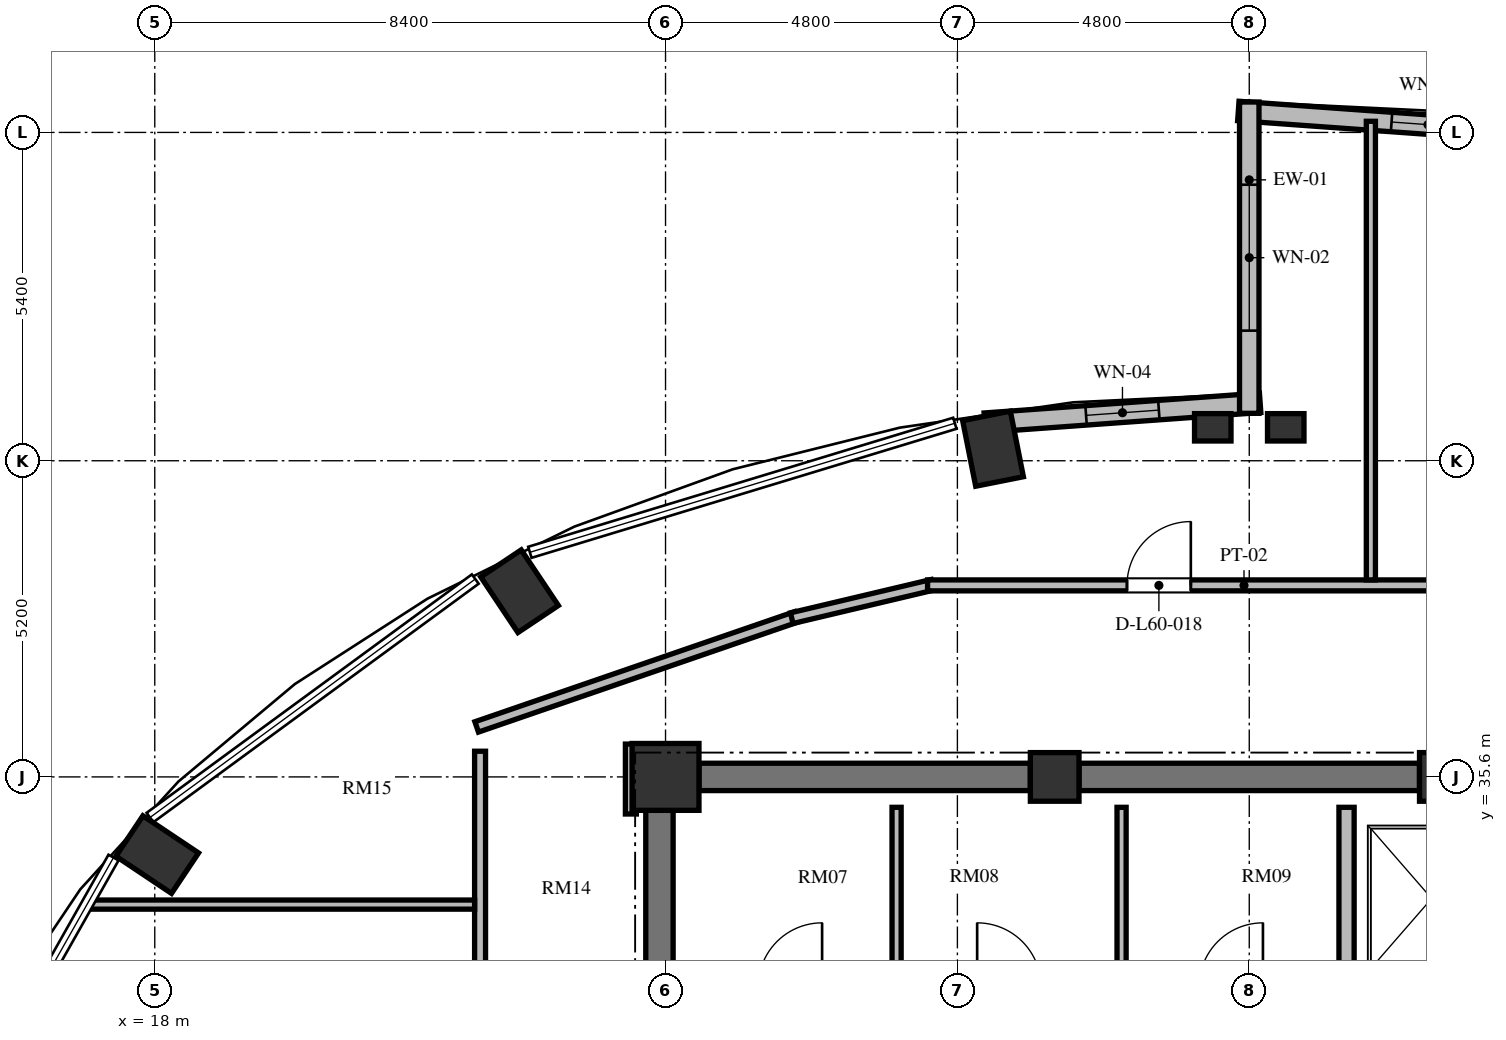
"""IFC4 building model, lengths in metres.
Left out: names, types, materials, properties, quantities, classifications, styles, units other than length and angle.
Written with IfcOpenShell. Run it as: python <this file> out.ifc"""

import sys

from ifc_helpers import new_model, si_unit, direction, frame, frame_2d, origin, origin_2d, place, context, subcontext, project, spatial, rectangle, extrude, element, fill, save


model = new_model("IFC4")
c1 = context("Model", 3, precision=1e-05, world=origin(), true_north=direction((0.0, 1.0)))
c2 = subcontext(c1, "Body", "Model", "MODEL_VIEW")
j1 = project(units=[si_unit("LENGTHUNIT", "METRE"), si_unit("PLANEANGLEUNIT", "RADIAN")], contexts=[c1])
p1 = place(None, origin())
s1 = spatial("IfcSite", under=j1, at=p1, CompositionType="ELEMENT")
p2 = place(p1, origin())
s2 = spatial("IfcBuilding", under=s1, at=p2, CompositionType="ELEMENT")
p3 = place(p2, frame((0.0, 0.0, 231.312)))
s3 = spatial("IfcBuildingStorey", under=s2, at=p3, CompositionType="ELEMENT", Elevation=231.312)
for number, where, z_axis, x_axis in (
    (1, (31.786, 40.998, 0.0), (0.0, 0.0, 1.0), (-0.195, 0.981, 0.0)),
    (2, (24.0, 38.654, 0.0), (0.0, 0.0, 1.0), (-0.556, 0.831, 0.0)),
    (3, (18.04, 34.323, 0.0), (0.0, 0.0, 1.0), (-0.831, 0.556, 0.0)),
):
    element("IfcColumn", number, at=place(p3, frame(where, z_axis=z_axis, x_axis=x_axis)), inside=s3, PredefinedType="COLUMN", context=c2, shape_type="SweptSolid", body=[
        extrude(rectangle(XDim=1.1, YDim=0.8, at=origin_2d()), origin(), (0.0, 0.0, 1.0), 3.648),
    ])
for number, where, z_axis, x_axis in (
    (4, (39.2, 35.6, 0.0), (0.0, 0.0, 1.0), (1.0, 0.0, 0.0)),
    (5, (32.8, 35.6, 0.0), (0.0, 0.0, 1.0), (1.0, 0.0, 0.0)),
):
    element("IfcColumn", number, at=place(p3, frame(where, z_axis=z_axis, x_axis=x_axis)), inside=s3, PredefinedType="COLUMN", context=c2, shape_type="SweptSolid", body=[
        extrude(rectangle(XDim=0.8, YDim=0.8, at=origin_2d()), origin(), (0.0, 0.0, 1.0), 3.648),
    ])
p4 = place(p3, frame((26.4, 35.6, 0.0), z_axis=(0.0, 0.0, 1.0), x_axis=(1.0, 0.0, 0.0)))
e6 = element("IfcColumn", 6, at=p4, inside=s3, PredefinedType="COLUMN", context=c2, shape_type="SweptSolid", body=[
    extrude(rectangle(XDim=1.1, YDim=1.1, at=origin_2d()), origin(), (0.0, 0.0, 1.0), 3.648),
])
for number, where, z_axis, x_axis in (
    (7, (35.4, 41.35, 0.0), (0.0, 0.0, 1.0), (1.0, 0.0, 0.0)),
    (8, (36.6, 41.35, 0.0), (0.0, 0.0, 1.0), (1.0, 0.0, 0.0)),
):
    element("IfcColumn", number, at=place(p3, frame(where, z_axis=z_axis, x_axis=x_axis)), inside=s3, PredefinedType="PILASTER", context=c2, shape_type="SweptSolid", body=[
        extrude(rectangle(XDim=0.6, YDim=0.45, at=origin_2d()), origin(), (0.0, 0.0, 1.0), 3.648),
    ])
p5 = place(p3, frame((26.3, 20.95, 0.0), z_axis=(0.0, 0.0, 1.0), x_axis=(0.0, 1.0, 0.0)))
e9 = element("IfcWall", 9, at=p5, inside=s3, PredefinedType="SHEAR", context=c2, shape_type="SweptSolid", body=[
    extrude(rectangle(XDim=14.1, YDim=0.45, at=frame_2d((7.05, 0.0))), origin(), (0.0, 0.0, 1.0), 3.648),
])
p6 = place(p5, frame((6.5, 0.0, 0.0)))
e10 = element("IfcOpeningElement", 10, at=p6, cuts=e9, PredefinedType="OPENING", context=c2, shape_type="SweptSolid", body=[
    extrude(rectangle(XDim=1.2, YDim=2.15, at=frame_2d((0.6, 1.075))), frame((0.0, 0.235, 0.0), z_axis=(0.0, -1.0, 0.0), x_axis=(1.0, 0.0, 0.0)), (0.0, 0.0, 1.0), 0.47),
])
p7 = place(p5, frame((9.6, 0.0, 0.0)))
e11 = element("IfcOpeningElement", 11, at=p7, cuts=e9, PredefinedType="OPENING", context=c2, shape_type="SweptSolid", body=[
    extrude(rectangle(XDim=1.3, YDim=2.2, at=frame_2d((0.65, 1.1))), frame((0.0, 0.235, 0.0), z_axis=(0.0, -1.0, 0.0), x_axis=(1.0, 0.0, 0.0)), (0.0, 0.0, 1.0), 0.47),
])
p8 = place(p5, frame((3.26, 0.0, 0.0)))
e12 = element("IfcOpeningElement", 12, at=p8, cuts=e9, PredefinedType="OPENING", context=c2, shape_type="SweptSolid", body=[
    extrude(rectangle(XDim=1.3, YDim=2.2, at=frame_2d((0.65, 1.1))), frame((0.0, 0.235, 0.0), z_axis=(0.0, -1.0, 0.0), x_axis=(1.0, 0.0, 0.0)), (0.0, 0.0, 1.0), 0.47),
])
p9 = place(p3, frame((26.95, 35.6, 0.0), z_axis=(0.0, 0.0, 1.0), x_axis=(1.0, 0.0, 0.0)))
e13 = element("IfcWall", 13, at=p9, inside=s3, PredefinedType="SHEAR", context=c2, shape_type="SweptSolid", body=[
    extrude(rectangle(XDim=5.45, YDim=0.45, at=frame_2d((2.725, 0.0))), origin(), (0.0, 0.0, 1.0), 3.648),
])
p10 = place(p3, frame((33.2, 35.6, 0.0), z_axis=(0.0, 0.0, 1.0), x_axis=(1.0, 0.0, 0.0)))
e14 = element("IfcWall", 14, at=p10, inside=s3, PredefinedType="SHEAR", context=c2, shape_type="SweptSolid", body=[
    extrude(rectangle(XDim=5.6, YDim=0.45, at=frame_2d((2.8, 0.0))), origin(), (0.0, 0.0, 1.0), 3.648),
])
p11 = place(p3, frame((40.35, 46.226, 0.0), z_axis=(0.0, 0.0, 1.0), x_axis=(-0.997409061056, 0.071938619141, 0.0)))
e15 = element("IfcWall", 15, at=p11, inside=s3, PredefinedType="SOLIDWALL", context=c2, shape_type="SweptSolid", body=[
    extrude(rectangle(XDim=4.541, YDim=0.32, at=frame_2d((2.271, 0.0))), origin(), (0.0, 0.0, 1.0), 3.448),
])
p12 = place(p11, frame((0.815, 0.0, 0.85)))
e16 = element("IfcOpeningElement", 16, at=p12, cuts=e15, PredefinedType="OPENING", context=c2, shape_type="SweptSolid", body=[
    extrude(rectangle(XDim=1.2, YDim=2.2, at=frame_2d((0.6, 1.1))), frame((0.0, 0.17, 0.0), z_axis=(0.0, -1.0, 0.0), x_axis=(1.0, 0.0, 0.0)), (0.0, 0.0, 1.0), 0.34),
])
p13 = place(p3, frame((36.179, 41.753, 0.0), z_axis=(0.0, 0.0, 1.0), x_axis=(-0.997408782787, -0.071942477163, 0.0)))
e17 = element("IfcWall", 17, at=p13, inside=s3, PredefinedType="SOLIDWALL", context=c2, shape_type="SweptSolid", body=[
    extrude(rectangle(XDim=4.541, YDim=0.32, at=frame_2d((2.27, 0.0))), origin(), (0.0, 0.0, 1.0), 3.448),
])
p14 = place(p13, frame((1.67, 0.0, 0.85)))
e18 = element("IfcOpeningElement", 18, at=p14, cuts=e17, PredefinedType="OPENING", context=c2, shape_type="SweptSolid", body=[
    extrude(rectangle(XDim=1.2, YDim=1.8, at=frame_2d((0.6, 0.9))), frame((0.0, 0.17, 0.0), z_axis=(0.0, -1.0, 0.0), x_axis=(1.0, 0.0, 0.0)), (0.0, 0.0, 1.0), 0.34),
])
p15 = place(p3, frame((36.0, 46.7, 0.0), z_axis=(0.0, 0.0, 1.0), x_axis=(0.0, -1.0, 0.0)))
e19 = element("IfcWall", 19, at=p15, inside=s3, PredefinedType="SOLIDWALL", context=c2, shape_type="SweptSolid", body=[
    extrude(rectangle(XDim=5.12, YDim=0.32, at=frame_2d((2.56, 0.0))), origin(), (0.0, 0.0, 1.0), 3.448),
])
p16 = place(p15, frame((1.36, 0.0, 0.84)))
e20 = element("IfcOpeningElement", 20, at=p16, cuts=e19, PredefinedType="OPENING", context=c2, shape_type="SweptSolid", body=[
    extrude(rectangle(XDim=2.4, YDim=2.04, at=frame_2d((1.2, 1.02))), frame((0.0, 0.17, 0.0), z_axis=(0.0, -1.0, 0.0), x_axis=(1.0, 0.0, 0.0)), (0.0, 0.0, 1.0), 0.34),
])
p17 = place(p3, frame((37.6, 32.42, 0.0), z_axis=(0.0, 0.0, 1.0), x_axis=(0.0, 1.0, 0.0)))
e21 = element("IfcWall", 21, at=p17, inside=s3, PredefinedType="SOLIDWALL", context=c2, shape_type="SweptSolid", body=[
    extrude(rectangle(XDim=2.68, YDim=0.25, at=frame_2d((1.34, 0.0))), origin(), (0.0, 0.0, 1.0), 3.448),
])
for number, where, z_axis, x_axis in (
    (22, (30.2, 32.42, 0.0), (0.0, 0.0, 1.0), (0.0, 1.0, 0.0)),
    (23, (33.9, 32.42, 0.0), (0.0, 0.0, 1.0), (0.0, 1.0, 0.0)),
):
    element("IfcWall", number, at=place(p3, frame(where, z_axis=z_axis, x_axis=x_axis)), inside=s3, PredefinedType="PARTITIONING", context=c2, shape_type="SweptSolid", body=[
        extrude(rectangle(XDim=2.68, YDim=0.15, at=frame_2d((1.34, 0.0))), origin(), (0.0, 0.0, 1.0), 3.448),
    ])
p18 = place(p3, frame((23.294, 36.422, 0.0), z_axis=(0.0, 0.0, 1.0), x_axis=(0.945493277461, 0.325641616316, 0.0)))
e24 = element("IfcWall", 24, at=p18, inside=s3, PredefinedType="PARTITIONING", context=c2, shape_type="SweptSolid", body=[
    extrude(rectangle(XDim=5.562, YDim=0.18, at=frame_2d((2.781, 0.0))), origin(), (0.0, 0.0, 1.0), 3.073),
])
p19 = place(p3, frame((28.476, 38.211, 0.0), z_axis=(0.0, 0.0, 1.0), x_axis=(0.973030562203, 0.230676234189, 0.0)))
e25 = element("IfcWall", 25, at=p19, inside=s3, PredefinedType="PARTITIONING", context=c2, shape_type="SweptSolid", body=[
    extrude(rectangle(XDim=2.377, YDim=0.18, at=frame_2d((1.188, 0.0))), origin(), (0.0, 0.0, 1.0), 3.448),
])
p20 = place(p3, frame((30.71, 38.75, 0.0), z_axis=(0.0, 0.0, 1.0), x_axis=(1.0, 0.0, 0.0)))
e26 = element("IfcWall", 26, at=p20, inside=s3, PredefinedType="PARTITIONING", context=c2, shape_type="SweptSolid", body=[
    extrude(rectangle(XDim=20.815, YDim=0.18, at=frame_2d((10.408, 0.0))), origin(), (0.0, 0.0, 1.0), 3.073),
])
p21 = place(p20, frame((13.194, 0.0, 0.0)))
e27 = element("IfcOpeningElement", 27, at=p21, cuts=e26, PredefinedType="OPENING", context=c2, shape_type="SweptSolid", body=[
    extrude(rectangle(XDim=1.4, YDim=2.2, at=frame_2d((0.7, 1.1))), frame((0.0, 0.1, 0.0), z_axis=(0.0, -1.0, 0.0), x_axis=(1.0, 0.0, 0.0)), (0.0, 0.0, 1.0), 0.2),
])
p22 = place(p20, frame((3.279, 0.0, 0.0)))
e28 = element("IfcOpeningElement", 28, at=p22, cuts=e26, PredefinedType="OPENING", context=c2, shape_type="SweptSolid", body=[
    extrude(rectangle(XDim=1.05, YDim=2.15, at=frame_2d((0.525, 1.075))), frame((0.0, 0.1, 0.0), z_axis=(0.0, -1.0, 0.0), x_axis=(1.0, 0.0, 0.0)), (0.0, 0.0, 1.0), 0.2),
])
p23 = place(p3, frame((25.83, 36.14, 0.0), z_axis=(0.0, 0.0, 1.0), x_axis=(0.0, -1.0, 0.0)))
e29 = element("IfcWall", 29, at=p23, inside=s3, PredefinedType="PARTITIONING", context=c2, shape_type="SweptSolid", body=[
    extrude(rectangle(XDim=1.15, YDim=0.18, at=frame_2d((0.575, 0.0))), origin(), (0.0, 0.0, 1.0), 3.448),
])
p24 = place(p3, frame((23.35, 19.98, 0.0), z_axis=(0.0, 0.0, 1.0), x_axis=(0.0, 1.0, 0.0)))
e30 = element("IfcWall", 30, at=p24, inside=s3, PredefinedType="PARTITIONING", context=c2, shape_type="SweptSolid", body=[
    extrude(rectangle(XDim=16.042, YDim=0.18, at=frame_2d((8.021, 0.0))), origin(), (0.0, 0.0, 1.0), 3.448),
])
p25 = place(p24, frame((5.477, 0.0, 0.0)))
e31 = element("IfcOpeningElement", 31, at=p25, cuts=e30, PredefinedType="OPENING", context=c2, shape_type="SweptSolid", body=[
    extrude(rectangle(XDim=1.05, YDim=2.15, at=frame_2d((0.525, 1.075))), frame((0.0, 0.1, 0.0), z_axis=(0.0, -1.0, 0.0), x_axis=(1.0, 0.0, 0.0)), (0.0, 0.0, 1.0), 0.2),
])
p26 = place(p24, frame((1.219, 0.0, 0.0)))
e32 = element("IfcOpeningElement", 32, at=p26, cuts=e30, PredefinedType="OPENING", context=c2, shape_type="SweptSolid", body=[
    extrude(rectangle(XDim=1.4, YDim=2.2, at=frame_2d((0.7, 1.1))), frame((0.0, 0.1, 0.0), z_axis=(0.0, -1.0, 0.0), x_axis=(1.0, 0.0, 0.0)), (0.0, 0.0, 1.0), 0.2),
])
p27 = place(p24, frame((10.511, 0.0, 0.0)))
e33 = element("IfcOpeningElement", 33, at=p27, cuts=e30, PredefinedType="OPENING", context=c2, shape_type="SweptSolid", body=[
    extrude(rectangle(XDim=1.05, YDim=2.15, at=frame_2d((0.525, 1.075))), frame((0.0, 0.1, 0.0), z_axis=(0.0, -1.0, 0.0), x_axis=(1.0, 0.0, 0.0)), (0.0, 0.0, 1.0), 0.2),
])
p28 = place(p3, frame((16.895, 33.5, 0.0), z_axis=(0.0, 0.0, 1.0), x_axis=(1.0, 0.0, 0.0)))
e34 = element("IfcWall", 34, at=p28, inside=s3, PredefinedType="PARTITIONING", context=c2, shape_type="SweptSolid", body=[
    extrude(rectangle(XDim=6.365, YDim=0.15, at=frame_2d((3.183, 0.0))), origin(), (0.0, 0.0, 1.0), 3.448),
])
p29 = place(p3, frame((38.0, 38.84, 0.0), z_axis=(0.0, 0.0, 1.0), x_axis=(0.0, 1.0, 0.0)))
e35 = element("IfcWall", 35, at=p29, inside=s3, PredefinedType="PARTITIONING", context=c2, shape_type="SweptSolid", body=[
    extrude(rectangle(XDim=7.543, YDim=0.15, at=frame_2d((3.771, 0.0))), origin(), (0.0, 0.0, 1.0), 3.448),
])
p30 = place(p12, origin())
e36 = element("IfcWindow", 36, at=p30, inside=s3, PartitioningType="SINGLE_PANEL", PredefinedType="WINDOW", context=c2, shape_type="SweptSolid", body=[
    extrude(rectangle(XDim=1.2, YDim=2.2, at=frame_2d((0.6, 1.1))), frame((0.0, 0.03, 0.0), z_axis=(0.0, -1.0, 0.0), x_axis=(1.0, 0.0, 0.0)), (0.0, 0.0, 1.0), 0.06),
])
fill(e16, e36)
p31 = place(p14, origin())
e37 = element("IfcWindow", 37, at=p31, inside=s3, PartitioningType="SINGLE_PANEL", PredefinedType="WINDOW", context=c2, shape_type="SweptSolid", body=[
    extrude(rectangle(XDim=1.2, YDim=1.8, at=frame_2d((0.6, 0.9))), frame((0.0, 0.03, 0.0), z_axis=(0.0, -1.0, 0.0), x_axis=(1.0, 0.0, 0.0)), (0.0, 0.0, 1.0), 0.06),
])
fill(e18, e37)
p32 = place(p16, origin())
e38 = element("IfcWindow", 38, at=p32, inside=s3, PartitioningType="SINGLE_PANEL", PredefinedType="WINDOW", context=c2, shape_type="SweptSolid", body=[
    extrude(rectangle(XDim=2.4, YDim=2.04, at=frame_2d((1.2, 1.02))), frame((0.0, 0.03, 0.0), z_axis=(0.0, -1.0, 0.0), x_axis=(1.0, 0.0, 0.0)), (0.0, 0.0, 1.0), 0.06),
])
fill(e20, e38)
p33 = place(p22, origin())
e39 = element("IfcDoor", 39, at=p33, inside=s3, OperationType="SINGLE_SWING_RIGHT", PredefinedType="DOOR", context=c2, shape_type="SweptSolid", body=[
    extrude(rectangle(XDim=1.05, YDim=2.15, at=frame_2d((0.525, 1.075))), frame((0.0, 0.025, 0.0), z_axis=(0.0, -1.0, 0.0), x_axis=(1.0, 0.0, 0.0)), (0.0, 0.0, 1.0), 0.05),
])
fill(e28, e39)
save(model, sys.argv[1])
